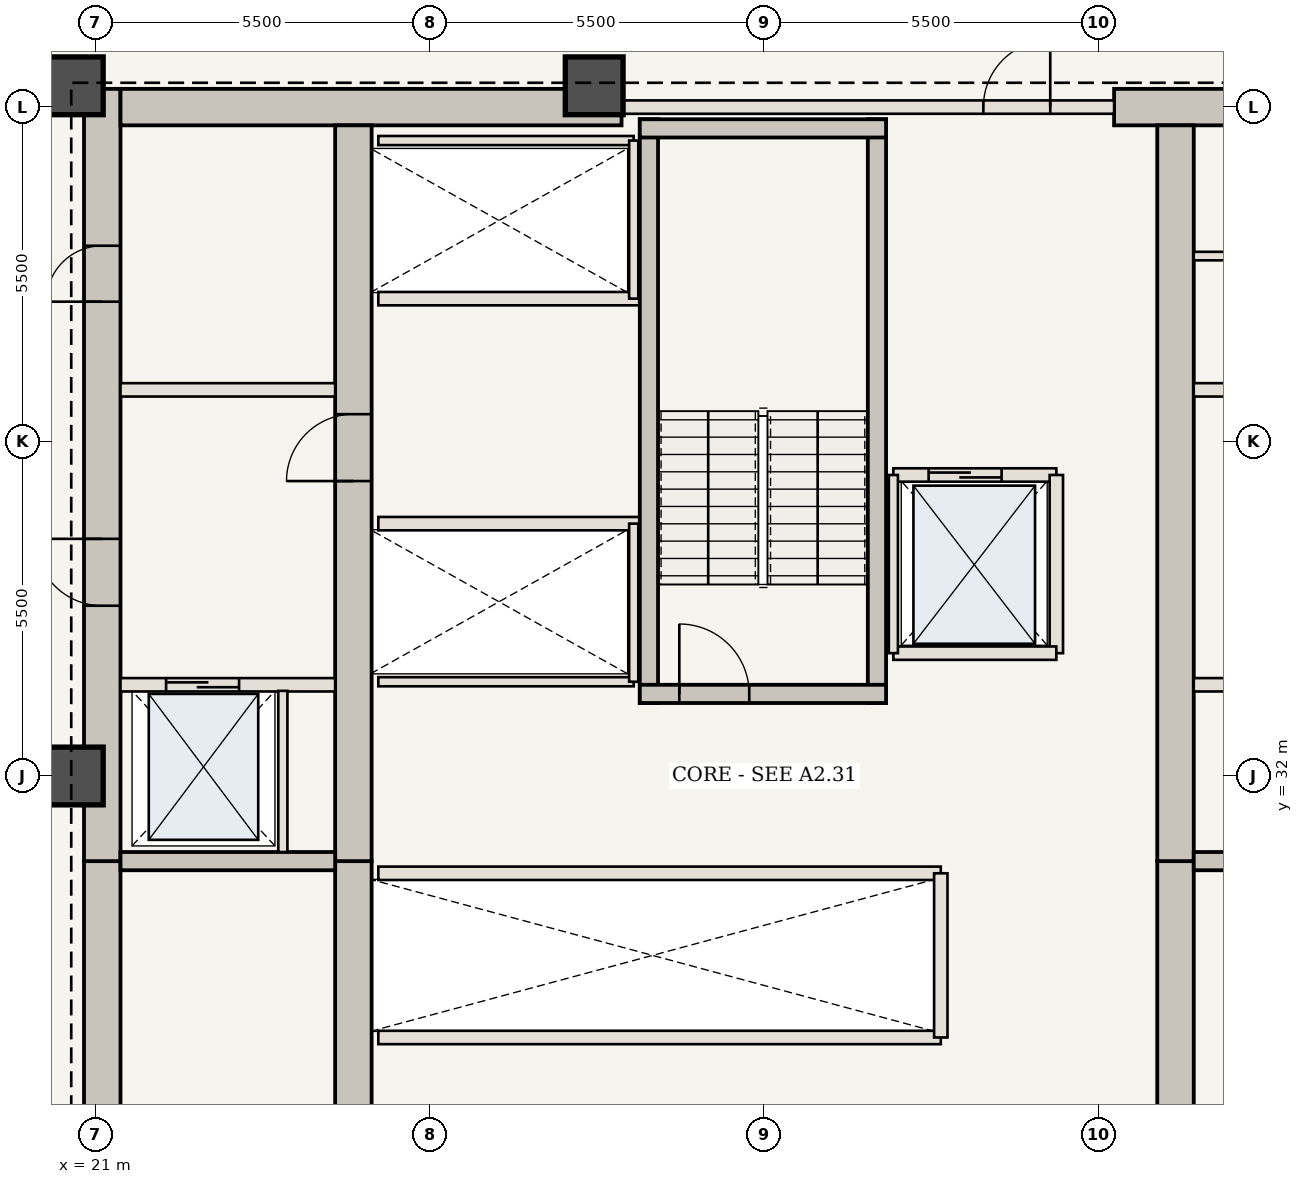
"""IFC4 building model, lengths in metres.
Left out: names, types, materials, properties, quantities, classifications, styles, units other than length and angle.
Written with IfcOpenShell. Run it as: python <this file> out.ifc"""

import sys

from ifc_helpers import new_model, si_unit, direction, frame, frame_2d, origin, origin_2d, place, context, subcontext, project, spatial, rectangle, extrude, element, fill, save


model = new_model("IFC4")
c1 = context("Model", 3, precision=1e-05, world=origin(), true_north=direction((0.0, 1.0)))
c2 = subcontext(c1, "Body", "Model", "MODEL_VIEW")
j1 = project(units=[si_unit("LENGTHUNIT", "METRE"), si_unit("PLANEANGLEUNIT", "RADIAN")], contexts=[c1])
p1 = place(None, origin())
s1 = spatial("IfcSite", under=j1, at=p1, CompositionType="ELEMENT")
p2 = place(p1, origin())
s2 = spatial("IfcBuilding", under=s1, at=p2, CompositionType="ELEMENT")
p3 = place(p2, frame((0.0, 0.0, 133.7)))
s3 = spatial("IfcBuildingStorey", under=s2, at=p3, CompositionType="ELEMENT", Elevation=133.7)
p4 = place(p3, frame((21.11, 20.65, 0.0), z_axis=(0.0, 0.0, 1.0), x_axis=(0.0, 1.0, 0.0)))
e1 = element("IfcWall", 1, at=p4, inside=s3, PredefinedType="SHEAR", context=c2, shape_type="SweptSolid", body=[
    extrude(rectangle(XDim=9.95, YDim=0.6, at=frame_2d((4.975, 0.0))), origin(), (0.0, 0.0, 1.0), 3.85),
])
p5 = place(p4, frame((1.1, 0.0, 0.0)))
e2 = element("IfcOpeningElement", 2, at=p5, cuts=e1, PredefinedType="OPENING", context=c2, shape_type="SweptSolid", body=[
    extrude(rectangle(XDim=1.15, YDim=2.15, at=frame_2d((0.575, 1.075))), frame((0.0, 0.31, 0.0), z_axis=(0.0, -1.0, 0.0), x_axis=(1.0, 0.0, 0.0)), (0.0, 0.0, 1.0), 0.62),
])
p6 = place(p3, frame((21.11, 30.6, 0.0), z_axis=(0.0, 0.0, 1.0), x_axis=(0.0, 1.0, 0.0)))
e3 = element("IfcWall", 3, at=p6, inside=s3, PredefinedType="SHEAR", context=c2, shape_type="SweptSolid", body=[
    extrude(rectangle(XDim=12.7, YDim=0.6, at=frame_2d((6.35, 0.0))), origin(), (0.0, 0.0, 1.0), 3.85),
])
p7 = place(p6, frame((4.2, 0.0, 0.0)))
e4 = element("IfcOpeningElement", 4, at=p7, cuts=e3, PredefinedType="OPENING", context=c2, shape_type="SweptSolid", body=[
    extrude(rectangle(XDim=1.1, YDim=2.15, at=frame_2d((0.55, 1.075))), frame((0.0, 0.31, 0.0), z_axis=(0.0, -1.0, 0.0), x_axis=(1.0, 0.0, 0.0)), (0.0, 0.0, 1.0), 0.62),
])
p8 = place(p6, frame((9.2, 0.0, 0.0)))
e5 = element("IfcOpeningElement", 5, at=p8, cuts=e3, PredefinedType="OPENING", context=c2, shape_type="SweptSolid", body=[
    extrude(rectangle(XDim=0.92, YDim=2.1, at=frame_2d((0.46, 1.05))), frame((0.0, 0.31, 0.0), z_axis=(0.0, -1.0, 0.0), x_axis=(1.0, 0.0, 0.0)), (0.0, 0.0, 1.0), 0.62),
])
p9 = place(p3, frame((21.41, 43.0, 0.0), z_axis=(0.0, 0.0, 1.0), x_axis=(1.0, 0.0, 0.0)))
e6 = element("IfcWall", 6, at=p9, inside=s3, PredefinedType="SHEAR", context=c2, shape_type="SweptSolid", body=[
    extrude(rectangle(XDim=8.24, YDim=0.6, at=frame_2d((4.12, 0.0))), origin(), (0.0, 0.0, 1.0), 3.85),
])
p10 = place(p3, frame((37.75, 43.0, 0.0), z_axis=(0.0, 0.0, 1.0), x_axis=(1.0, 0.0, 0.0)))
e7 = element("IfcWall", 7, at=p10, inside=s3, PredefinedType="SHEAR", context=c2, shape_type="SweptSolid", body=[
    extrude(rectangle(XDim=4.84, YDim=0.6, at=frame_2d((2.42, 0.0))), origin(), (0.0, 0.0, 1.0), 3.85),
])
p11 = place(p3, frame((25.24, 21.25, 0.0), z_axis=(0.0, 0.0, 1.0), x_axis=(0.0, 1.0, 0.0)))
e8 = element("IfcWall", 8, at=p11, inside=s3, PredefinedType="SHEAR", context=c2, shape_type="SweptSolid", body=[
    extrude(rectangle(XDim=9.35, YDim=0.6, at=frame_2d((4.675, 0.0))), origin(), (0.0, 0.0, 1.0), 3.85),
])
p12 = place(p3, frame((25.24, 30.6, 0.0), z_axis=(0.0, 0.0, 1.0), x_axis=(0.0, 1.0, 0.0)))
e9 = element("IfcWall", 9, at=p12, inside=s3, PredefinedType="SHEAR", context=c2, shape_type="SweptSolid", body=[
    extrude(rectangle(XDim=12.1, YDim=0.6, at=frame_2d((6.05, 0.0))), origin(), (0.0, 0.0, 1.0), 3.85),
])
p13 = place(p12, frame((6.25, 0.0, 0.0)))
e10 = element("IfcOpeningElement", 10, at=p13, cuts=e9, PredefinedType="OPENING", context=c2, shape_type="SweptSolid", body=[
    extrude(rectangle(XDim=1.1, YDim=2.15, at=frame_2d((0.55, 1.075))), frame((0.0, 0.31, 0.0), z_axis=(0.0, -1.0, 0.0), x_axis=(1.0, 0.0, 0.0)), (0.0, 0.0, 1.0), 0.62),
])
p14 = place(p3, frame((38.76, 21.25, 0.0), z_axis=(0.0, 0.0, 1.0), x_axis=(0.0, 1.0, 0.0)))
e11 = element("IfcWall", 11, at=p14, inside=s3, PredefinedType="SHEAR", context=c2, shape_type="SweptSolid", body=[
    extrude(rectangle(XDim=9.35, YDim=0.6, at=frame_2d((4.675, 0.0))), origin(), (0.0, 0.0, 1.0), 3.85),
])
p15 = place(p3, frame((38.76, 30.6, 0.0), z_axis=(0.0, 0.0, 1.0), x_axis=(0.0, 1.0, 0.0)))
e12 = element("IfcWall", 12, at=p15, inside=s3, PredefinedType="SHEAR", context=c2, shape_type="SweptSolid", body=[
    extrude(rectangle(XDim=12.1, YDim=0.6, at=frame_2d((6.05, 0.0))), origin(), (0.0, 0.0, 1.0), 3.85),
])
for number, where, z_axis, x_axis in (
    (13, (29.2, 43.35, 0.0), (0.0, 0.0, 1.0), (1.0, 0.0, 0.0)),
    (14, (20.65, 43.35, 0.0), (0.0, 0.0, 1.0), (1.0, 0.0, 0.0)),
    (15, (20.65, 32.0, 0.0), (0.0, 0.0, 1.0), (1.0, 0.0, 0.0)),
):
    element("IfcColumn", number, at=place(p3, frame(where, z_axis=z_axis, x_axis=x_axis)), inside=s3, PredefinedType="COLUMN", context=c2, shape_type="SweptSolid", body=[
        extrude(rectangle(XDim=0.95, YDim=0.95, at=origin_2d()), origin(), (0.0, 0.0, 1.0), 3.85),
    ])
for number, where, z_axis, x_axis in (
    (16, (21.41, 30.6, 0.0), (0.0, 0.0, 1.0), (1.0, 0.0, 0.0)),
    (17, (39.06, 30.6, 0.0), (0.0, 0.0, 1.0), (1.0, 0.0, 0.0)),
):
    element("IfcWall", number, at=place(p3, frame(where, z_axis=z_axis, x_axis=x_axis)), inside=s3, PredefinedType="SHEAR", context=c2, shape_type="SweptSolid", body=[
        extrude(rectangle(XDim=3.53, YDim=0.3, at=frame_2d((1.765, 0.0))), origin(), (0.0, 0.0, 1.0), 3.685),
    ])
p16 = place(p3, frame((21.41, 33.5, 0.0), z_axis=(0.0, 0.0, 1.0), x_axis=(1.0, 0.0, 0.0)))
e18 = element("IfcWall", 18, at=p16, inside=s3, PredefinedType="STANDARD", context=c2, shape_type="SweptSolid", body=[
    extrude(rectangle(XDim=3.53, YDim=0.22, at=frame_2d((1.765, 0.0))), origin(), (0.0, 0.0, 1.0), 3.685),
])
p17 = place(p16, frame((0.75, 0.0, 0.0)))
e19 = element("IfcOpeningElement", 19, at=p17, cuts=e18, PredefinedType="OPENING", context=c2, shape_type="SweptSolid", body=[
    extrude(rectangle(XDim=1.2, YDim=2.2, at=frame_2d((0.6, 1.1))), frame((0.0, 0.12, 0.0), z_axis=(0.0, -1.0, 0.0), x_axis=(1.0, 0.0, 0.0)), (0.0, 0.0, 1.0), 0.24),
])
p18 = place(p3, frame((24.08, 30.75, 0.0), z_axis=(0.0, 0.0, 1.0), x_axis=(0.0, 1.0, 0.0)))
e20 = element("IfcWall", 20, at=p18, inside=s3, PredefinedType="STANDARD", context=c2, shape_type="SweptSolid", body=[
    extrude(rectangle(XDim=2.65, YDim=0.15, at=frame_2d((1.325, 0.0))), origin(), (0.0, 0.0, 1.0), 3.685),
])
p19 = place(p3, frame((39.06, 33.5, 0.0), z_axis=(0.0, 0.0, 1.0), x_axis=(1.0, 0.0, 0.0)))
e21 = element("IfcWall", 21, at=p19, inside=s3, PredefinedType="STANDARD", context=c2, shape_type="SweptSolid", body=[
    extrude(rectangle(XDim=3.53, YDim=0.22, at=frame_2d((1.765, 0.0))), origin(), (0.0, 0.0, 1.0), 3.685),
])
p20 = place(p19, frame((1.55, 0.0, 0.0)))
e22 = element("IfcOpeningElement", 22, at=p20, cuts=e21, PredefinedType="OPENING", context=c2, shape_type="SweptSolid", body=[
    extrude(rectangle(XDim=1.2, YDim=2.2, at=frame_2d((0.6, 1.1))), frame((0.0, 0.12, 0.0), z_axis=(0.0, -1.0, 0.0), x_axis=(1.0, 0.0, 0.0)), (0.0, 0.0, 1.0), 0.24),
])
for number, where, z_axis, x_axis in (
    (23, (21.41, 38.35, 0.0), (0.0, 0.0, 1.0), (1.0, 0.0, 0.0)),
    (24, (39.06, 38.35, 0.0), (0.0, 0.0, 1.0), (1.0, 0.0, 0.0)),
):
    element("IfcWall", number, at=place(p3, frame(where, z_axis=z_axis, x_axis=x_axis)), inside=s3, PredefinedType="STANDARD", context=c2, shape_type="SweptSolid", body=[
        extrude(rectangle(XDim=3.53, YDim=0.22, at=frame_2d((1.765, 0.0))), origin(), (0.0, 0.0, 1.0), 3.685),
    ])
p21 = place(p3, frame((39.06, 40.55, 0.0), z_axis=(0.0, 0.0, 1.0), x_axis=(1.0, 0.0, 0.0)))
e25 = element("IfcWall", 25, at=p21, inside=s3, PredefinedType="STANDARD", context=c2, shape_type="SweptSolid", body=[
    extrude(rectangle(XDim=3.53, YDim=0.14, at=frame_2d((1.765, 0.0))), origin(), (0.0, 0.0, 1.0), 3.685),
])
for number, where, z_axis, x_axis in (
    (26, (25.65, 27.7, 0.0), (0.0, 0.0, 1.0), (1.0, 0.0, 0.0)),
    (27, (25.65, 30.4, 0.0), (0.0, 0.0, 1.0), (1.0, 0.0, 0.0)),
):
    element("IfcWall", number, at=place(p3, frame(where, z_axis=z_axis, x_axis=x_axis)), inside=s3, PredefinedType="STANDARD", context=c2, shape_type="SweptSolid", body=[
        extrude(rectangle(XDim=9.25, YDim=0.22, at=frame_2d((4.625, 0.0))), origin(), (0.0, 0.0, 1.0), 3.685),
    ])
p22 = place(p3, frame((34.9, 27.7, 0.0), z_axis=(0.0, 0.0, 1.0), x_axis=(0.0, 1.0, 0.0)))
e28 = element("IfcWall", 28, at=p22, inside=s3, PredefinedType="STANDARD", context=c2, shape_type="SweptSolid", body=[
    extrude(rectangle(XDim=2.7, YDim=0.22, at=frame_2d((1.35, 0.0))), origin(), (0.0, 0.0, 1.0), 3.685),
])
p23 = place(p3, frame((25.65, 36.15, 0.0), z_axis=(0.0, 0.0, 1.0), x_axis=(1.0, 0.0, 0.0)))
e29 = element("IfcWall", 29, at=p23, inside=s3, PredefinedType="STANDARD", context=c2, shape_type="SweptSolid", body=[
    extrude(rectangle(XDim=4.3, YDim=0.22, at=frame_2d((2.15, 0.0))), origin(), (0.0, 0.0, 1.0), 3.685),
])
p24 = place(p3, frame((25.65, 33.55, 0.0), z_axis=(0.0, 0.0, 1.0), x_axis=(1.0, 0.0, 0.0)))
e30 = element("IfcWall", 30, at=p24, inside=s3, PredefinedType="STANDARD", context=c2, shape_type="SweptSolid", body=[
    extrude(rectangle(XDim=4.2, YDim=0.15, at=frame_2d((2.1, 0.0))), origin(), (0.0, 0.0, 1.0), 3.685),
])
p25 = place(p3, frame((29.85, 33.55, 0.0), z_axis=(0.0, 0.0, 1.0), x_axis=(0.0, 1.0, 0.0)))
e31 = element("IfcWall", 31, at=p25, inside=s3, PredefinedType="STANDARD", context=c2, shape_type="SweptSolid", body=[
    extrude(rectangle(XDim=2.6, YDim=0.15, at=frame_2d((1.3, 0.0))), origin(), (0.0, 0.0, 1.0), 3.685),
])
p26 = place(p3, frame((25.65, 39.85, 0.0), z_axis=(0.0, 0.0, 1.0), x_axis=(1.0, 0.0, 0.0)))
e32 = element("IfcWall", 32, at=p26, inside=s3, PredefinedType="STANDARD", context=c2, shape_type="SweptSolid", body=[
    extrude(rectangle(XDim=4.3, YDim=0.22, at=frame_2d((2.15, 0.0))), origin(), (0.0, 0.0, 1.0), 3.685),
])
p27 = place(p3, frame((25.65, 42.45, 0.0), z_axis=(0.0, 0.0, 1.0), x_axis=(1.0, 0.0, 0.0)))
e33 = element("IfcWall", 33, at=p27, inside=s3, PredefinedType="STANDARD", context=c2, shape_type="SweptSolid", body=[
    extrude(rectangle(XDim=4.2, YDim=0.15, at=frame_2d((2.1, 0.0))), origin(), (0.0, 0.0, 1.0), 3.685),
])
p28 = place(p3, frame((29.85, 39.85, 0.0), z_axis=(0.0, 0.0, 1.0), x_axis=(0.0, 1.0, 0.0)))
e34 = element("IfcWall", 34, at=p28, inside=s3, PredefinedType="STANDARD", context=c2, shape_type="SweptSolid", body=[
    extrude(rectangle(XDim=2.6, YDim=0.15, at=frame_2d((1.3, 0.0))), origin(), (0.0, 0.0, 1.0), 3.685),
])
for number, where, z_axis, x_axis in (
    (35, (30.1, 33.2, 0.0), (0.0, 0.0, 1.0), (0.0, 1.0, 0.0)),
    (36, (33.85, 33.2, 0.0), (0.0, 0.0, 1.0), (0.0, 1.0, 0.0)),
):
    element("IfcWall", number, at=place(p3, frame(where, z_axis=z_axis, x_axis=x_axis)), inside=s3, PredefinedType="SHEAR", context=c2, shape_type="SweptSolid", body=[
        extrude(rectangle(XDim=9.6, YDim=0.3, at=frame_2d((4.8, 0.0))), origin(), (0.0, 0.0, 1.0), 3.685),
    ])
p29 = place(p3, frame((29.95, 33.35, 0.0), z_axis=(0.0, 0.0, 1.0), x_axis=(1.0, 0.0, 0.0)))
e37 = element("IfcWall", 37, at=p29, inside=s3, PredefinedType="SHEAR", context=c2, shape_type="SweptSolid", body=[
    extrude(rectangle(XDim=4.05, YDim=0.3, at=frame_2d((2.025, 0.0))), origin(), (0.0, 0.0, 1.0), 3.685),
])
p30 = place(p29, frame((0.65, 0.0, 0.0)))
e38 = element("IfcOpeningElement", 38, at=p30, cuts=e37, PredefinedType="OPENING", context=c2, shape_type="SweptSolid", body=[
    extrude(rectangle(XDim=1.15, YDim=2.15, at=frame_2d((0.575, 1.075))), frame((0.0, 0.16, 0.0), z_axis=(0.0, -1.0, 0.0), x_axis=(1.0, 0.0, 0.0)), (0.0, 0.0, 1.0), 0.32),
])
p31 = place(p3, frame((29.95, 42.65, 0.0), z_axis=(0.0, 0.0, 1.0), x_axis=(1.0, 0.0, 0.0)))
e39 = element("IfcWall", 39, at=p31, inside=s3, PredefinedType="SHEAR", context=c2, shape_type="SweptSolid", body=[
    extrude(rectangle(XDim=4.05, YDim=0.3, at=frame_2d((2.025, 0.0))), origin(), (0.0, 0.0, 1.0), 3.685),
])
p32 = place(p3, frame((29.65, 43.0, 0.0), z_axis=(0.0, 0.0, 1.0), x_axis=(1.0, 0.0, 0.0)))
e40 = element("IfcWall", 40, at=p32, inside=s3, PredefinedType="STANDARD", context=c2, shape_type="SweptSolid", body=[
    extrude(rectangle(XDim=8.1, YDim=0.22, at=frame_2d((4.05, 0.0))), origin(), (0.0, 0.0, 1.0), 3.685),
])
p33 = place(p32, frame((5.95, 0.0, 0.0)))
e41 = element("IfcOpeningElement", 41, at=p33, cuts=e40, PredefinedType="OPENING", context=c2, shape_type="SweptSolid", body=[
    extrude(rectangle(XDim=1.1, YDim=2.15, at=frame_2d((0.55, 1.075))), frame((0.0, 0.12, 0.0), z_axis=(0.0, -1.0, 0.0), x_axis=(1.0, 0.0, 0.0)), (0.0, 0.0, 1.0), 0.24),
])
p34 = place(p3, frame((34.12, 36.95, 0.0), z_axis=(0.0, 0.0, 1.0), x_axis=(1.0, 0.0, 0.0)))
e42 = element("IfcWall", 42, at=p34, inside=s3, PredefinedType="STANDARD", context=c2, shape_type="SweptSolid", body=[
    extrude(rectangle(XDim=2.68, YDim=0.22, at=frame_2d((1.34, 0.0))), origin(), (0.0, 0.0, 1.0), 3.685),
])
p35 = place(p34, frame((0.58, 0.0, 0.0)))
e43 = element("IfcOpeningElement", 43, at=p35, cuts=e42, PredefinedType="OPENING", context=c2, shape_type="SweptSolid", body=[
    extrude(rectangle(XDim=1.2, YDim=2.2, at=frame_2d((0.6, 1.1))), frame((0.0, 0.12, 0.0), z_axis=(0.0, -1.0, 0.0), x_axis=(1.0, 0.0, 0.0)), (0.0, 0.0, 1.0), 0.24),
])
p36 = place(p3, frame((36.8, 34.02, 0.0), z_axis=(0.0, 0.0, 1.0), x_axis=(0.0, 1.0, 0.0)))
e44 = element("IfcWall", 44, at=p36, inside=s3, PredefinedType="STANDARD", context=c2, shape_type="SweptSolid", body=[
    extrude(rectangle(XDim=2.93, YDim=0.22, at=frame_2d((1.465, 0.0))), origin(), (0.0, 0.0, 1.0), 3.685),
])
p37 = place(p3, frame((34.12, 34.02, 0.0), z_axis=(0.0, 0.0, 1.0), x_axis=(1.0, 0.0, 0.0)))
e45 = element("IfcWall", 45, at=p37, inside=s3, PredefinedType="STANDARD", context=c2, shape_type="SweptSolid", body=[
    extrude(rectangle(XDim=2.68, YDim=0.22, at=frame_2d((1.34, 0.0))), origin(), (0.0, 0.0, 1.0), 3.685),
])
p38 = place(p3, frame((34.12, 34.02, 0.0), z_axis=(0.0, 0.0, 1.0), x_axis=(0.0, 1.0, 0.0)))
e46 = element("IfcWall", 46, at=p38, inside=s3, PredefinedType="STANDARD", context=c2, shape_type="SweptSolid", body=[
    extrude(rectangle(XDim=2.93, YDim=0.15, at=frame_2d((1.465, 0.0))), origin(), (0.0, 0.0, 1.0), 3.685),
])
p39 = place(p7, origin())
e47 = element("IfcDoor", 47, at=p39, inside=s3, OperationType="SINGLE_SWING_RIGHT", PredefinedType="DOOR", context=c2, shape_type="SweptSolid", body=[
    extrude(rectangle(XDim=1.1, YDim=2.15, at=frame_2d((0.55, 1.075))), frame((0.0, 0.025, 0.0), z_axis=(0.0, -1.0, 0.0), x_axis=(1.0, 0.0, 0.0)), (0.0, 0.0, 1.0), 0.05),
])
fill(e4, e47)
p40 = place(p13, origin())
e48 = element("IfcDoor", 48, at=p40, inside=s3, OperationType="SINGLE_SWING_LEFT", PredefinedType="DOOR", context=c2, shape_type="SweptSolid", body=[
    extrude(rectangle(XDim=1.1, YDim=2.15, at=frame_2d((0.55, 1.075))), frame((0.0, 0.025, 0.0), z_axis=(0.0, -1.0, 0.0), x_axis=(1.0, 0.0, 0.0)), (0.0, 0.0, 1.0), 0.05),
])
fill(e10, e48)
p41 = place(p8, origin())
e49 = element("IfcDoor", 49, at=p41, inside=s3, OperationType="SINGLE_SWING_LEFT", PredefinedType="DOOR", context=c2, shape_type="SweptSolid", body=[
    extrude(rectangle(XDim=0.92, YDim=2.1, at=frame_2d((0.46, 1.05))), frame((0.0, 0.025, 0.0), z_axis=(0.0, -1.0, 0.0), x_axis=(1.0, 0.0, 0.0)), (0.0, 0.0, 1.0), 0.05),
])
fill(e5, e49)
p42 = place(p17, origin())
e50 = element("IfcDoor", 50, at=p42, inside=s3, OperationType="DOUBLE_DOOR_SLIDING", PredefinedType="DOOR", context=c2, shape_type="SweptSolid", body=[
    extrude(rectangle(XDim=1.2, YDim=2.2, at=frame_2d((0.6, 1.1))), frame((0.0, 0.025, 0.0), z_axis=(0.0, -1.0, 0.0), x_axis=(1.0, 0.0, 0.0)), (0.0, 0.0, 1.0), 0.05),
])
fill(e19, e50)
p43 = place(p30, origin())
e51 = element("IfcDoor", 51, at=p43, inside=s3, OperationType="SINGLE_SWING_LEFT", PredefinedType="DOOR", context=c2, shape_type="SweptSolid", body=[
    extrude(rectangle(XDim=1.15, YDim=2.15, at=frame_2d((0.575, 1.075))), frame((0.0, 0.025, 0.0), z_axis=(0.0, -1.0, 0.0), x_axis=(1.0, 0.0, 0.0)), (0.0, 0.0, 1.0), 0.05),
])
fill(e38, e51)
p44 = place(p33, origin())
e52 = element("IfcDoor", 52, at=p44, inside=s3, OperationType="SINGLE_SWING_RIGHT", PredefinedType="DOOR", context=c2, shape_type="SweptSolid", body=[
    extrude(rectangle(XDim=1.1, YDim=2.15, at=frame_2d((0.55, 1.075))), frame((0.0, 0.025, 0.0), z_axis=(0.0, -1.0, 0.0), x_axis=(1.0, 0.0, 0.0)), (0.0, 0.0, 1.0), 0.05),
])
fill(e41, e52)
p45 = place(p35, origin())
e53 = element("IfcDoor", 53, at=p45, inside=s3, OperationType="DOUBLE_DOOR_SLIDING", PredefinedType="DOOR", context=c2, shape_type="SweptSolid", body=[
    extrude(rectangle(XDim=1.2, YDim=2.2, at=frame_2d((0.6, 1.1))), frame((0.0, 0.025, 0.0), z_axis=(0.0, -1.0, 0.0), x_axis=(1.0, 0.0, 0.0)), (0.0, 0.0, 1.0), 0.05),
])
fill(e43, e53)
save(model, sys.argv[1])
